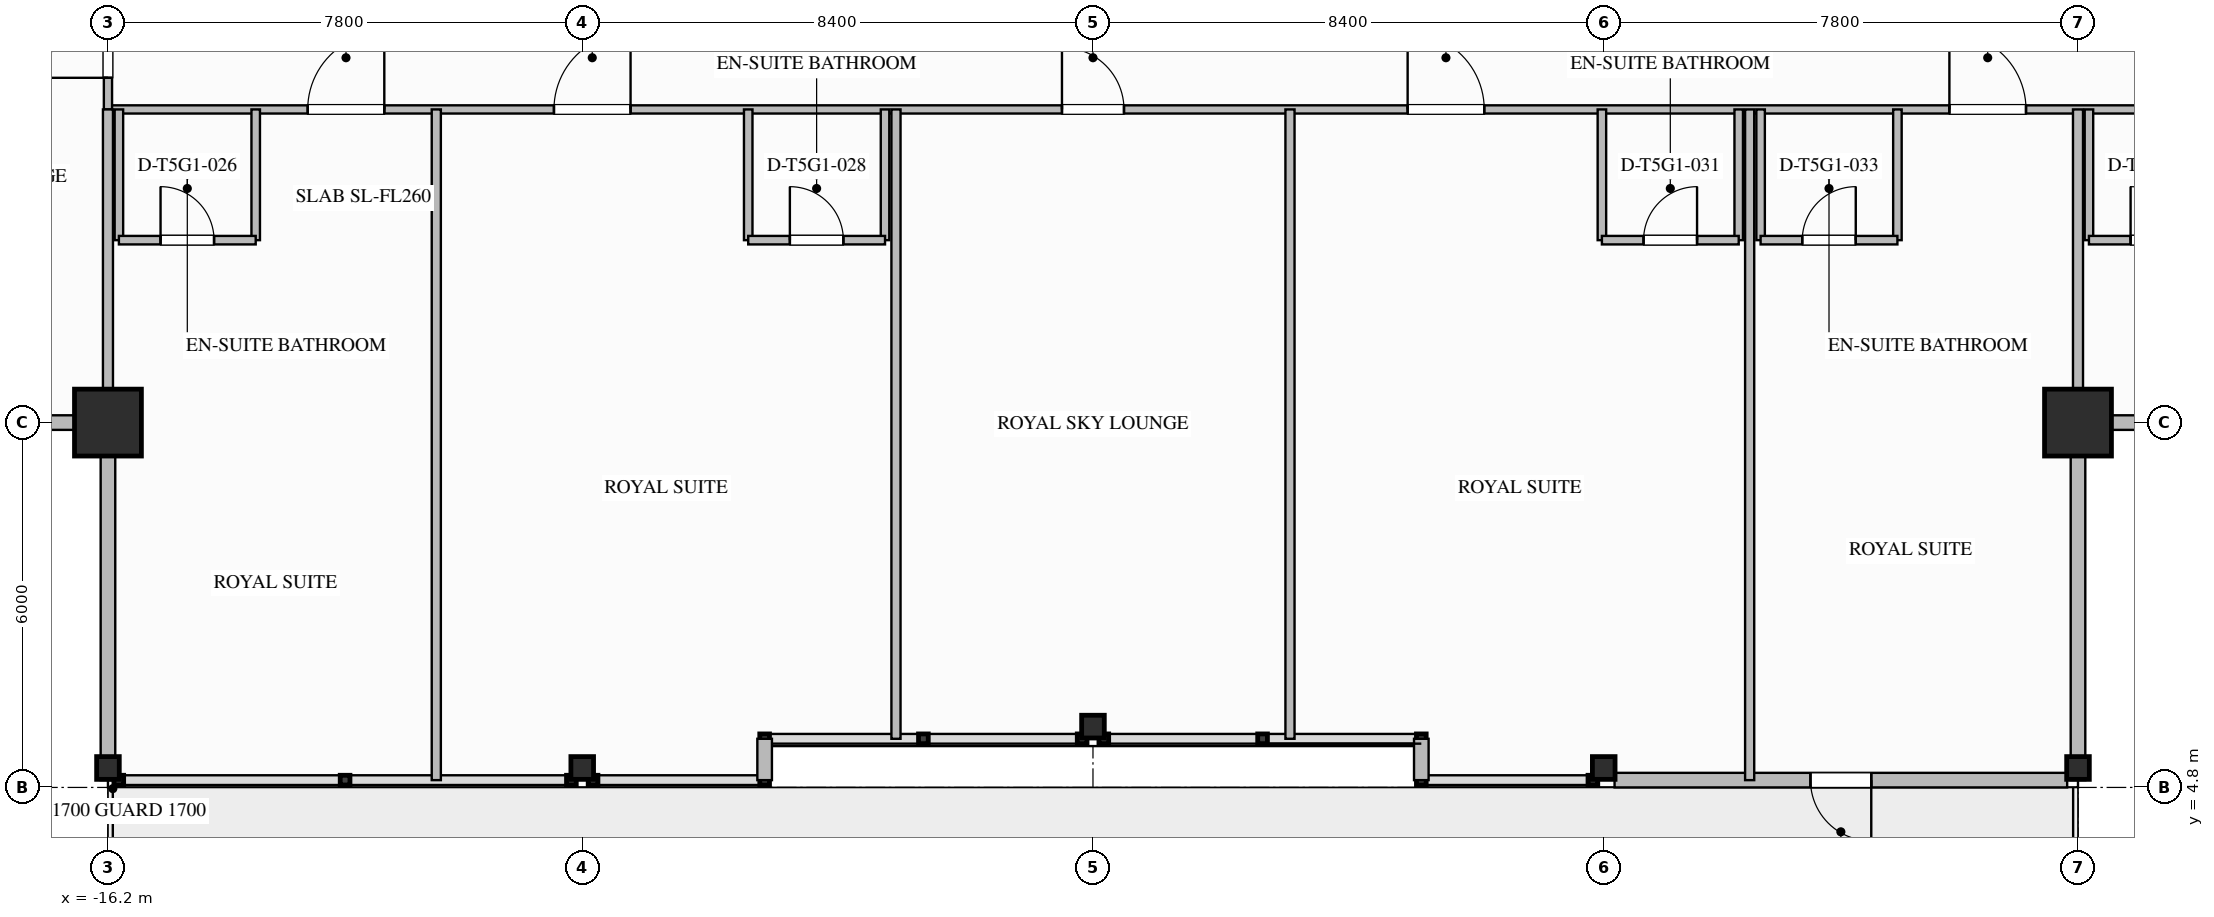
"""IFC4 building model, lengths in metres.
Left out: names, types, materials, properties, quantities, classifications, styles, units other than length and angle.
Written with IfcOpenShell. Run it as: python <this file> out.ifc"""

import sys

from ifc_helpers import new_model, si_unit, direction, frame, frame_2d, origin, origin_2d, place, context, subcontext, project, spatial, rectangle, i_section, extrude, element, fill, save


model = new_model("IFC4")
c1 = context("Model", 3, precision=1e-05, world=origin(), true_north=direction((0.0, 1.0)))
c2 = subcontext(c1, "Body", "Model", "MODEL_VIEW")
j1 = project(units=[si_unit("LENGTHUNIT", "METRE"), si_unit("PLANEANGLEUNIT", "RADIAN")], contexts=[c1])
p1 = place(None, origin())
s1 = spatial("IfcSite", under=j1, at=p1, CompositionType="ELEMENT")
p2 = place(p1, origin())
s2 = spatial("IfcBuilding", under=s1, at=p2, CompositionType="ELEMENT")
p3 = place(p2, frame((0.0, 0.0, 265.0)))
s3 = spatial("IfcBuildingStorey", under=s2, at=p3, CompositionType="ELEMENT", Elevation=265.0)
for number, where, z_axis, x_axis in (
    (1, (-16.2, 10.8, 0.0), (0.0, 0.0, 1.0), (1.0, 0.0, 0.0)),
    (2, (16.2, 10.8, 0.0), (0.0, 0.0, 1.0), (1.0, 0.0, 0.0)),
):
    element("IfcColumn", number, at=place(p3, frame(where, z_axis=z_axis, x_axis=x_axis)), inside=s3, PredefinedType="COLUMN", context=c2, shape_type="SweptSolid", body=[
        extrude(rectangle(XDim=1.1, YDim=1.1, at=origin_2d()), origin(), (0.0, 0.0, 1.0), 3.65),
    ])
for number, where, z_axis, x_axis in (
    (3, (-16.2, 5.12, -0.26), (0.0, 0.0, 1.0), (0.0, 1.0, 0.0)),
    (4, (-8.4, 5.12, -0.26), (0.0, 0.0, 1.0), (0.0, 1.0, 0.0)),
    (5, (0.0, 5.8, -0.26), (0.0, 0.0, 1.0), (0.0, 1.0, 0.0)),
    (6, (8.4, 5.12, -0.26), (0.0, 0.0, 1.0), (0.0, 1.0, 0.0)),
    (7, (16.2, 5.12, -0.26), (0.0, 0.0, 1.0), (0.0, 1.0, 0.0)),
):
    element("IfcColumn", number, at=place(p3, frame(where, z_axis=z_axis, x_axis=x_axis)), inside=s3, PredefinedType="COLUMN", context=c2, shape_type="SweptSolid", body=[
        extrude(i_section(OverallWidth=0.374, OverallDepth=0.372, WebThickness=0.016, FlangeThickness=0.026, FilletRadius=0.025, at=origin_2d()), origin(), (0.0, 0.0, 1.0), 3.907),
    ])
p4 = place(p3, frame((16.022, 4.92, 0.0), z_axis=(0.0, 0.0, 1.0), x_axis=(-1.0, 0.0, 0.0)))
e8 = element("IfcWall", 8, at=p4, inside=s3, PredefinedType="STANDARD", context=c2, shape_type="SweptSolid", body=[
    extrude(rectangle(XDim=7.444, YDim=0.24, at=frame_2d((3.722, 0.0))), origin(), (0.0, 0.0, 1.0), 2.853),
])
p5 = place(p4, frame((3.222, 0.0, 0.0)))
e9 = element("IfcOpeningElement", 9, at=p5, cuts=e8, PredefinedType="OPENING", context=c2, shape_type="SweptSolid", body=[
    extrude(rectangle(XDim=1.0, YDim=2.2, at=frame_2d((0.5, 1.1))), frame((0.0, 0.13, 0.0), z_axis=(0.0, -1.0, 0.0), x_axis=(1.0, 0.0, 0.0)), (0.0, 0.0, 1.0), 0.26),
])
for number, where, z_axis, x_axis in (
    (10, (-16.2, 4.92, 0.0), (0.0, 0.0, 1.0), (0.0, 1.0, 0.0)),
    (11, (-16.2, 10.8, 0.0), (0.0, 0.0, 1.0), (-1.0, 0.0, 0.0)),
    (12, (22.08, 10.8, 0.0), (0.0, 0.0, 1.0), (-1.0, 0.0, 0.0)),
    (13, (16.2, 10.8, 0.0), (0.0, 0.0, 1.0), (0.0, -1.0, 0.0)),
):
    element("IfcWall", number, at=place(p3, frame(where, z_axis=z_axis, x_axis=x_axis)), inside=s3, PredefinedType="STANDARD", context=c2, shape_type="SweptSolid", body=[
        extrude(rectangle(XDim=5.88, YDim=0.24, at=frame_2d((2.94, 0.0))), origin(), (0.0, 0.0, 1.0), 2.779),
    ])
for number, where, z_axis, x_axis in (
    (14, (5.4, 4.92, 0.0), (0.0, 0.0, 1.0), (0.0, 1.0, 0.0)),
    (15, (-5.4, 5.6, 0.0), (0.0, 0.0, 1.0), (0.0, -1.0, 0.0)),
):
    element("IfcWall", number, at=place(p3, frame(where, z_axis=z_axis, x_axis=x_axis)), inside=s3, PredefinedType="STANDARD", context=c2, shape_type="SweptSolid", body=[
        extrude(rectangle(XDim=0.68, YDim=0.24, at=frame_2d((0.34, 0.0))), origin(), (0.0, 0.0, 1.0), 3.39),
    ])
p6 = place(p3, frame((-16.2, 15.95, 0.0), z_axis=(0.0, 0.0, 1.0), x_axis=(1.0, 0.0, 0.0)))
e16 = element("IfcWall", 16, at=p6, inside=s3, PredefinedType="PARTITIONING", context=c2, shape_type="SweptSolid", body=[
    extrude(rectangle(XDim=38.28, YDim=0.135, at=frame_2d((19.14, 0.0))), origin(), (0.0, 0.0, 1.0), 3.39),
])
p7 = place(p6, frame((35.785, 0.0, 0.0)))
e17 = element("IfcOpeningElement", 17, at=p7, cuts=e16, PredefinedType="OPENING", context=c2, shape_type="SweptSolid", body=[
    extrude(rectangle(XDim=1.26, YDim=2.2, at=frame_2d((0.63, 1.1))), frame((0.0, 0.077, 0.0), z_axis=(0.0, -1.0, 0.0), x_axis=(1.0, 0.0, 0.0)), (0.0, 0.0, 1.0), 0.155),
])
p8 = place(p6, frame((3.285, 0.0, 0.0)))
e18 = element("IfcOpeningElement", 18, at=p8, cuts=e16, PredefinedType="OPENING", context=c2, shape_type="SweptSolid", body=[
    extrude(rectangle(XDim=1.26, YDim=2.2, at=frame_2d((0.63, 1.1))), frame((0.0, 0.077, 0.0), z_axis=(0.0, -1.0, 0.0), x_axis=(1.0, 0.0, 0.0)), (0.0, 0.0, 1.0), 0.155),
])
p9 = place(p6, frame((7.335, 0.0, 0.0)))
e19 = element("IfcOpeningElement", 19, at=p9, cuts=e16, PredefinedType="OPENING", context=c2, shape_type="SweptSolid", body=[
    extrude(rectangle(XDim=1.26, YDim=2.2, at=frame_2d((0.63, 1.1))), frame((0.0, 0.077, 0.0), z_axis=(0.0, -1.0, 0.0), x_axis=(1.0, 0.0, 0.0)), (0.0, 0.0, 1.0), 0.155),
])
p10 = place(p6, frame((15.69, 0.0, 0.0)))
e20 = element("IfcOpeningElement", 20, at=p10, cuts=e16, PredefinedType="OPENING", context=c2, shape_type="SweptSolid", body=[
    extrude(rectangle(XDim=1.02, YDim=2.15, at=frame_2d((0.51, 1.075))), frame((0.0, 0.077, 0.0), z_axis=(0.0, -1.0, 0.0), x_axis=(1.0, 0.0, 0.0)), (0.0, 0.0, 1.0), 0.155),
])
p11 = place(p6, frame((21.375, 0.0, 0.0)))
e21 = element("IfcOpeningElement", 21, at=p11, cuts=e16, PredefinedType="OPENING", context=c2, shape_type="SweptSolid", body=[
    extrude(rectangle(XDim=1.26, YDim=2.2, at=frame_2d((0.63, 1.1))), frame((0.0, 0.077, 0.0), z_axis=(0.0, -1.0, 0.0), x_axis=(1.0, 0.0, 0.0)), (0.0, 0.0, 1.0), 0.155),
])
p12 = place(p6, frame((30.285, 0.0, 0.0)))
e22 = element("IfcOpeningElement", 22, at=p12, cuts=e16, PredefinedType="OPENING", context=c2, shape_type="SweptSolid", body=[
    extrude(rectangle(XDim=1.26, YDim=2.2, at=frame_2d((0.63, 1.1))), frame((0.0, 0.077, 0.0), z_axis=(0.0, -1.0, 0.0), x_axis=(1.0, 0.0, 0.0)), (0.0, 0.0, 1.0), 0.155),
])
p13 = place(p3, frame((-16.2, 15.95, 0.0), z_axis=(0.0, 0.0, 1.0), x_axis=(0.0, 1.0, 0.0)))
e23 = element("IfcWall", 23, at=p13, inside=s3, PredefinedType="PARTITIONING", context=c2, shape_type="SweptSolid", body=[
    extrude(rectangle(XDim=2.45, YDim=0.135, at=frame_2d((1.225, 0.0))), origin(), (0.0, 0.0, 1.0), 2.764),
])
p14 = place(p13, frame((0.52, 0.0, 0.0)))
e24 = element("IfcOpeningElement", 24, at=p14, cuts=e23, PredefinedType="OPENING", context=c2, shape_type="SweptSolid", body=[
    extrude(rectangle(XDim=1.02, YDim=2.15, at=frame_2d((0.51, 1.075))), frame((0.0, 0.077, 0.0), z_axis=(0.0, -1.0, 0.0), x_axis=(1.0, 0.0, 0.0)), (0.0, 0.0, 1.0), 0.155),
])
for number, where, z_axis, x_axis in (
    (25, (-16.2, 10.92, 0.0), (0.0, 0.0, 1.0), (0.0, 1.0, 0.0)),
    (26, (16.2, 10.92, 0.0), (0.0, 0.0, 1.0), (0.0, 1.0, 0.0)),
):
    element("IfcWall", number, at=place(p3, frame(where, z_axis=z_axis, x_axis=x_axis)), inside=s3, PredefinedType="PARTITIONING", context=c2, shape_type="SweptSolid", body=[
        extrude(rectangle(XDim=5.03, YDim=0.165, at=frame_2d((2.515, 0.0))), origin(), (0.0, 0.0, 1.0), 2.764),
    ])
p15 = place(p3, frame((16.38, 15.95, 0.0), z_axis=(0.0, 0.0, 1.0), x_axis=(0.0, -1.0, 0.0)))
e27 = element("IfcWall", 27, at=p15, inside=s3, PredefinedType="PLUMBINGWALL", context=c2, shape_type="SweptSolid", body=[
    extrude(rectangle(XDim=2.15, YDim=0.14, at=frame_2d((1.075, 0.0))), origin(), (0.0, 0.0, 1.0), 2.764),
])
p16 = place(p3, frame((16.38, 13.8, 0.0), z_axis=(0.0, 0.0, 1.0), x_axis=(1.0, 0.0, 0.0)))
e28 = element("IfcWall", 28, at=p16, inside=s3, PredefinedType="PLUMBINGWALL", context=c2, shape_type="SweptSolid", body=[
    extrude(rectangle(XDim=2.25, YDim=0.14, at=frame_2d((1.125, 0.0))), origin(), (0.0, 0.0, 1.0), 3.39),
])
p17 = place(p16, frame((0.685, 0.0, 0.0)))
e29 = element("IfcOpeningElement", 29, at=p17, cuts=e28, PredefinedType="OPENING", context=c2, shape_type="SweptSolid", body=[
    extrude(rectangle(XDim=0.88, YDim=2.1, at=frame_2d((0.44, 1.05))), frame((0.0, 0.08, 0.0), z_axis=(0.0, -1.0, 0.0), x_axis=(1.0, 0.0, 0.0)), (0.0, 0.0, 1.0), 0.16),
])
p18 = place(p3, frame((-16.02, 15.95, 0.0), z_axis=(0.0, 0.0, 1.0), x_axis=(0.0, -1.0, 0.0)))
e30 = element("IfcWall", 30, at=p18, inside=s3, PredefinedType="PLUMBINGWALL", context=c2, shape_type="SweptSolid", body=[
    extrude(rectangle(XDim=2.15, YDim=0.14, at=frame_2d((1.075, 0.0))), origin(), (0.0, 0.0, 1.0), 2.764),
])
p19 = place(p3, frame((-13.77, 15.95, 0.0), z_axis=(0.0, 0.0, 1.0), x_axis=(0.0, -1.0, 0.0)))
e31 = element("IfcWall", 31, at=p19, inside=s3, PredefinedType="PLUMBINGWALL", context=c2, shape_type="SweptSolid", body=[
    extrude(rectangle(XDim=2.15, YDim=0.14, at=frame_2d((1.075, 0.0))), origin(), (0.0, 0.0, 1.0), 3.39),
])
p20 = place(p3, frame((-16.02, 13.8, 0.0), z_axis=(0.0, 0.0, 1.0), x_axis=(1.0, 0.0, 0.0)))
e32 = element("IfcWall", 32, at=p20, inside=s3, PredefinedType="PLUMBINGWALL", context=c2, shape_type="SweptSolid", body=[
    extrude(rectangle(XDim=2.25, YDim=0.14, at=frame_2d((1.125, 0.0))), origin(), (0.0, 0.0, 1.0), 3.39),
])
p21 = place(p20, frame((0.685, 0.0, 0.0)))
e33 = element("IfcOpeningElement", 33, at=p21, cuts=e32, PredefinedType="OPENING", context=c2, shape_type="SweptSolid", body=[
    extrude(rectangle(XDim=0.88, YDim=2.1, at=frame_2d((0.44, 1.05))), frame((0.0, 0.08, 0.0), z_axis=(0.0, -1.0, 0.0), x_axis=(1.0, 0.0, 0.0)), (0.0, 0.0, 1.0), 0.16),
])
p22 = place(p3, frame((-10.8, 4.92, 0.0), z_axis=(0.0, 0.0, 1.0), x_axis=(0.0, 1.0, 0.0)))
e34 = element("IfcWall", 34, at=p22, inside=s3, PredefinedType="PARTITIONING", context=c2, shape_type="SweptSolid", body=[
    extrude(rectangle(XDim=11.03, YDim=0.15, at=frame_2d((5.515, 0.0))), origin(), (0.0, 0.0, 1.0), 3.39),
])
for number, where, z_axis, x_axis in (
    (35, (-5.67, 15.95, 0.0), (0.0, 0.0, 1.0), (0.0, -1.0, 0.0)),
    (36, (-3.42, 15.95, 0.0), (0.0, 0.0, 1.0), (0.0, -1.0, 0.0)),
):
    element("IfcWall", number, at=place(p3, frame(where, z_axis=z_axis, x_axis=x_axis)), inside=s3, PredefinedType="PLUMBINGWALL", context=c2, shape_type="SweptSolid", body=[
        extrude(rectangle(XDim=2.15, YDim=0.14, at=frame_2d((1.075, 0.0))), origin(), (0.0, 0.0, 1.0), 3.39),
    ])
p23 = place(p3, frame((-5.67, 13.8, 0.0), z_axis=(0.0, 0.0, 1.0), x_axis=(1.0, 0.0, 0.0)))
e37 = element("IfcWall", 37, at=p23, inside=s3, PredefinedType="PLUMBINGWALL", context=c2, shape_type="SweptSolid", body=[
    extrude(rectangle(XDim=2.25, YDim=0.14, at=frame_2d((1.125, 0.0))), origin(), (0.0, 0.0, 1.0), 3.39),
])
p24 = place(p23, frame((0.685, 0.0, 0.0)))
e38 = element("IfcOpeningElement", 38, at=p24, cuts=e37, PredefinedType="OPENING", context=c2, shape_type="SweptSolid", body=[
    extrude(rectangle(XDim=0.88, YDim=2.1, at=frame_2d((0.44, 1.05))), frame((0.0, 0.08, 0.0), z_axis=(0.0, -1.0, 0.0), x_axis=(1.0, 0.0, 0.0)), (0.0, 0.0, 1.0), 0.16),
])
for number, where, z_axis, x_axis in (
    (39, (-3.24, 5.6, 0.0), (0.0, 0.0, 1.0), (0.0, 1.0, 0.0)),
    (40, (3.24, 5.6, 0.0), (0.0, 0.0, 1.0), (0.0, 1.0, 0.0)),
):
    element("IfcWall", number, at=place(p3, frame(where, z_axis=z_axis, x_axis=x_axis)), inside=s3, PredefinedType="PARTITIONING", context=c2, shape_type="SweptSolid", body=[
        extrude(rectangle(XDim=10.35, YDim=0.15, at=frame_2d((5.175, 0.0))), origin(), (0.0, 0.0, 1.0), 3.39),
    ])
p25 = place(p3, frame((8.37, 15.95, 0.0), z_axis=(0.0, 0.0, 1.0), x_axis=(0.0, -1.0, 0.0)))
e41 = element("IfcWall", 41, at=p25, inside=s3, PredefinedType="PLUMBINGWALL", context=c2, shape_type="SweptSolid", body=[
    extrude(rectangle(XDim=2.15, YDim=0.14, at=frame_2d((1.075, 0.0))), origin(), (0.0, 0.0, 1.0), 2.767),
])
p26 = place(p3, frame((10.62, 15.95, 0.0), z_axis=(0.0, 0.0, 1.0), x_axis=(0.0, -1.0, 0.0)))
e42 = element("IfcWall", 42, at=p26, inside=s3, PredefinedType="PLUMBINGWALL", context=c2, shape_type="SweptSolid", body=[
    extrude(rectangle(XDim=2.15, YDim=0.14, at=frame_2d((1.075, 0.0))), origin(), (0.0, 0.0, 1.0), 3.39),
])
p27 = place(p3, frame((8.37, 13.8, 0.0), z_axis=(0.0, 0.0, 1.0), x_axis=(1.0, 0.0, 0.0)))
e43 = element("IfcWall", 43, at=p27, inside=s3, PredefinedType="PLUMBINGWALL", context=c2, shape_type="SweptSolid", body=[
    extrude(rectangle(XDim=2.25, YDim=0.14, at=frame_2d((1.125, 0.0))), origin(), (0.0, 0.0, 1.0), 3.39),
])
p28 = place(p27, frame((0.685, 0.0, 0.0)))
e44 = element("IfcOpeningElement", 44, at=p28, cuts=e43, PredefinedType="OPENING", context=c2, shape_type="SweptSolid", body=[
    extrude(rectangle(XDim=0.88, YDim=2.1, at=frame_2d((0.44, 1.05))), frame((0.0, 0.08, 0.0), z_axis=(0.0, -1.0, 0.0), x_axis=(1.0, 0.0, 0.0)), (0.0, 0.0, 1.0), 0.16),
])
p29 = place(p3, frame((10.8, 4.92, 0.0), z_axis=(0.0, 0.0, 1.0), x_axis=(0.0, 1.0, 0.0)))
e45 = element("IfcWall", 45, at=p29, inside=s3, PredefinedType="PARTITIONING", context=c2, shape_type="SweptSolid", body=[
    extrude(rectangle(XDim=11.03, YDim=0.15, at=frame_2d((5.515, 0.0))), origin(), (0.0, 0.0, 1.0), 3.39),
])
for number, where, z_axis, x_axis in (
    (46, (10.98, 15.95, 0.0), (0.0, 0.0, 1.0), (0.0, -1.0, 0.0)),
    (47, (13.23, 15.95, 0.0), (0.0, 0.0, 1.0), (0.0, -1.0, 0.0)),
):
    element("IfcWall", number, at=place(p3, frame(where, z_axis=z_axis, x_axis=x_axis)), inside=s3, PredefinedType="PLUMBINGWALL", context=c2, shape_type="SweptSolid", body=[
        extrude(rectangle(XDim=2.15, YDim=0.14, at=frame_2d((1.075, 0.0))), origin(), (0.0, 0.0, 1.0), 3.39),
    ])
p30 = place(p3, frame((10.98, 13.8, 0.0), z_axis=(0.0, 0.0, 1.0), x_axis=(1.0, 0.0, 0.0)))
e48 = element("IfcWall", 48, at=p30, inside=s3, PredefinedType="PLUMBINGWALL", context=c2, shape_type="SweptSolid", body=[
    extrude(rectangle(XDim=2.25, YDim=0.14, at=frame_2d((1.125, 0.0))), origin(), (0.0, 0.0, 1.0), 3.39),
])
p31 = place(p30, frame((0.685, 0.0, 0.0)))
e49 = element("IfcOpeningElement", 49, at=p31, cuts=e48, PredefinedType="OPENING", context=c2, shape_type="SweptSolid", body=[
    extrude(rectangle(XDim=0.88, YDim=2.1, at=frame_2d((0.44, 1.05))), frame((0.0, 0.08, 0.0), z_axis=(0.0, -1.0, 0.0), x_axis=(1.0, 0.0, 0.0)), (0.0, 0.0, 1.0), 0.16),
])
p32 = place(p5, origin())
e50 = element("IfcDoor", 50, at=p32, inside=s3, OperationType="SINGLE_SWING_LEFT", PredefinedType="DOOR", context=c2, shape_type="SweptSolid", body=[
    extrude(rectangle(XDim=1.0, YDim=2.2, at=frame_2d((0.5, 1.1))), frame((0.0, 0.025, 0.0), z_axis=(0.0, -1.0, 0.0), x_axis=(1.0, 0.0, 0.0)), (0.0, 0.0, 1.0), 0.05),
])
fill(e9, e50)
p33 = place(p14, origin())
e51 = element("IfcDoor", 51, at=p33, inside=s3, OperationType="SINGLE_SWING_LEFT", PredefinedType="DOOR", context=c2, shape_type="SweptSolid", body=[
    extrude(rectangle(XDim=1.02, YDim=2.15, at=frame_2d((0.51, 1.075))), frame((0.0, 0.025, 0.0), z_axis=(0.0, -1.0, 0.0), x_axis=(1.0, 0.0, 0.0)), (0.0, 0.0, 1.0), 0.05),
])
fill(e24, e51)
p34 = place(p17, origin())
e52 = element("IfcDoor", 52, at=p34, inside=s3, OperationType="SINGLE_SWING_LEFT", PredefinedType="DOOR", context=c2, shape_type="SweptSolid", body=[
    extrude(rectangle(XDim=0.88, YDim=2.1, at=frame_2d((0.44, 1.05))), frame((0.0, 0.025, 0.0), z_axis=(0.0, -1.0, 0.0), x_axis=(1.0, 0.0, 0.0)), (0.0, 0.0, 1.0), 0.05),
])
fill(e29, e52)
p35 = place(p21, origin())
e53 = element("IfcDoor", 53, at=p35, inside=s3, OperationType="SINGLE_SWING_LEFT", PredefinedType="DOOR", context=c2, shape_type="SweptSolid", body=[
    extrude(rectangle(XDim=0.88, YDim=2.1, at=frame_2d((0.44, 1.05))), frame((0.0, 0.025, 0.0), z_axis=(0.0, -1.0, 0.0), x_axis=(1.0, 0.0, 0.0)), (0.0, 0.0, 1.0), 0.05),
])
fill(e33, e53)
p36 = place(p8, origin())
e54 = element("IfcDoor", 54, at=p36, inside=s3, OperationType="SINGLE_SWING_RIGHT", PredefinedType="DOOR", context=c2, shape_type="SweptSolid", body=[
    extrude(rectangle(XDim=1.26, YDim=2.2, at=frame_2d((0.63, 1.1))), frame((0.0, 0.025, 0.0), z_axis=(0.0, -1.0, 0.0), x_axis=(1.0, 0.0, 0.0)), (0.0, 0.0, 1.0), 0.05),
])
fill(e18, e54)
p37 = place(p24, origin())
e55 = element("IfcDoor", 55, at=p37, inside=s3, OperationType="SINGLE_SWING_LEFT", PredefinedType="DOOR", context=c2, shape_type="SweptSolid", body=[
    extrude(rectangle(XDim=0.88, YDim=2.1, at=frame_2d((0.44, 1.05))), frame((0.0, 0.025, 0.0), z_axis=(0.0, -1.0, 0.0), x_axis=(1.0, 0.0, 0.0)), (0.0, 0.0, 1.0), 0.05),
])
fill(e38, e55)
p38 = place(p9, origin())
e56 = element("IfcDoor", 56, at=p38, inside=s3, OperationType="SINGLE_SWING_RIGHT", PredefinedType="DOOR", context=c2, shape_type="SweptSolid", body=[
    extrude(rectangle(XDim=1.26, YDim=2.2, at=frame_2d((0.63, 1.1))), frame((0.0, 0.025, 0.0), z_axis=(0.0, -1.0, 0.0), x_axis=(1.0, 0.0, 0.0)), (0.0, 0.0, 1.0), 0.05),
])
fill(e19, e56)
p39 = place(p10, origin())
e57 = element("IfcDoor", 57, at=p39, inside=s3, OperationType="SINGLE_SWING_LEFT", PredefinedType="DOOR", context=c2, shape_type="SweptSolid", body=[
    extrude(rectangle(XDim=1.02, YDim=2.15, at=frame_2d((0.51, 1.075))), frame((0.0, 0.025, 0.0), z_axis=(0.0, -1.0, 0.0), x_axis=(1.0, 0.0, 0.0)), (0.0, 0.0, 1.0), 0.05),
])
fill(e20, e57)
p40 = place(p28, origin())
e58 = element("IfcDoor", 58, at=p40, inside=s3, OperationType="SINGLE_SWING_RIGHT", PredefinedType="DOOR", context=c2, shape_type="SweptSolid", body=[
    extrude(rectangle(XDim=0.88, YDim=2.1, at=frame_2d((0.44, 1.05))), frame((0.0, 0.025, 0.0), z_axis=(0.0, -1.0, 0.0), x_axis=(1.0, 0.0, 0.0)), (0.0, 0.0, 1.0), 0.05),
])
fill(e44, e58)
p41 = place(p11, origin())
e59 = element("IfcDoor", 59, at=p41, inside=s3, OperationType="SINGLE_SWING_LEFT", PredefinedType="DOOR", context=c2, shape_type="SweptSolid", body=[
    extrude(rectangle(XDim=1.26, YDim=2.2, at=frame_2d((0.63, 1.1))), frame((0.0, 0.025, 0.0), z_axis=(0.0, -1.0, 0.0), x_axis=(1.0, 0.0, 0.0)), (0.0, 0.0, 1.0), 0.05),
])
fill(e21, e59)
p42 = place(p31, origin())
e60 = element("IfcDoor", 60, at=p42, inside=s3, OperationType="SINGLE_SWING_RIGHT", PredefinedType="DOOR", context=c2, shape_type="SweptSolid", body=[
    extrude(rectangle(XDim=0.88, YDim=2.1, at=frame_2d((0.44, 1.05))), frame((0.0, 0.025, 0.0), z_axis=(0.0, -1.0, 0.0), x_axis=(1.0, 0.0, 0.0)), (0.0, 0.0, 1.0), 0.05),
])
fill(e49, e60)
p43 = place(p12, origin())
e61 = element("IfcDoor", 61, at=p43, inside=s3, OperationType="SINGLE_SWING_LEFT", PredefinedType="DOOR", context=c2, shape_type="SweptSolid", body=[
    extrude(rectangle(XDim=1.26, YDim=2.2, at=frame_2d((0.63, 1.1))), frame((0.0, 0.025, 0.0), z_axis=(0.0, -1.0, 0.0), x_axis=(1.0, 0.0, 0.0)), (0.0, 0.0, 1.0), 0.05),
])
fill(e22, e61)
save(model, sys.argv[1])
